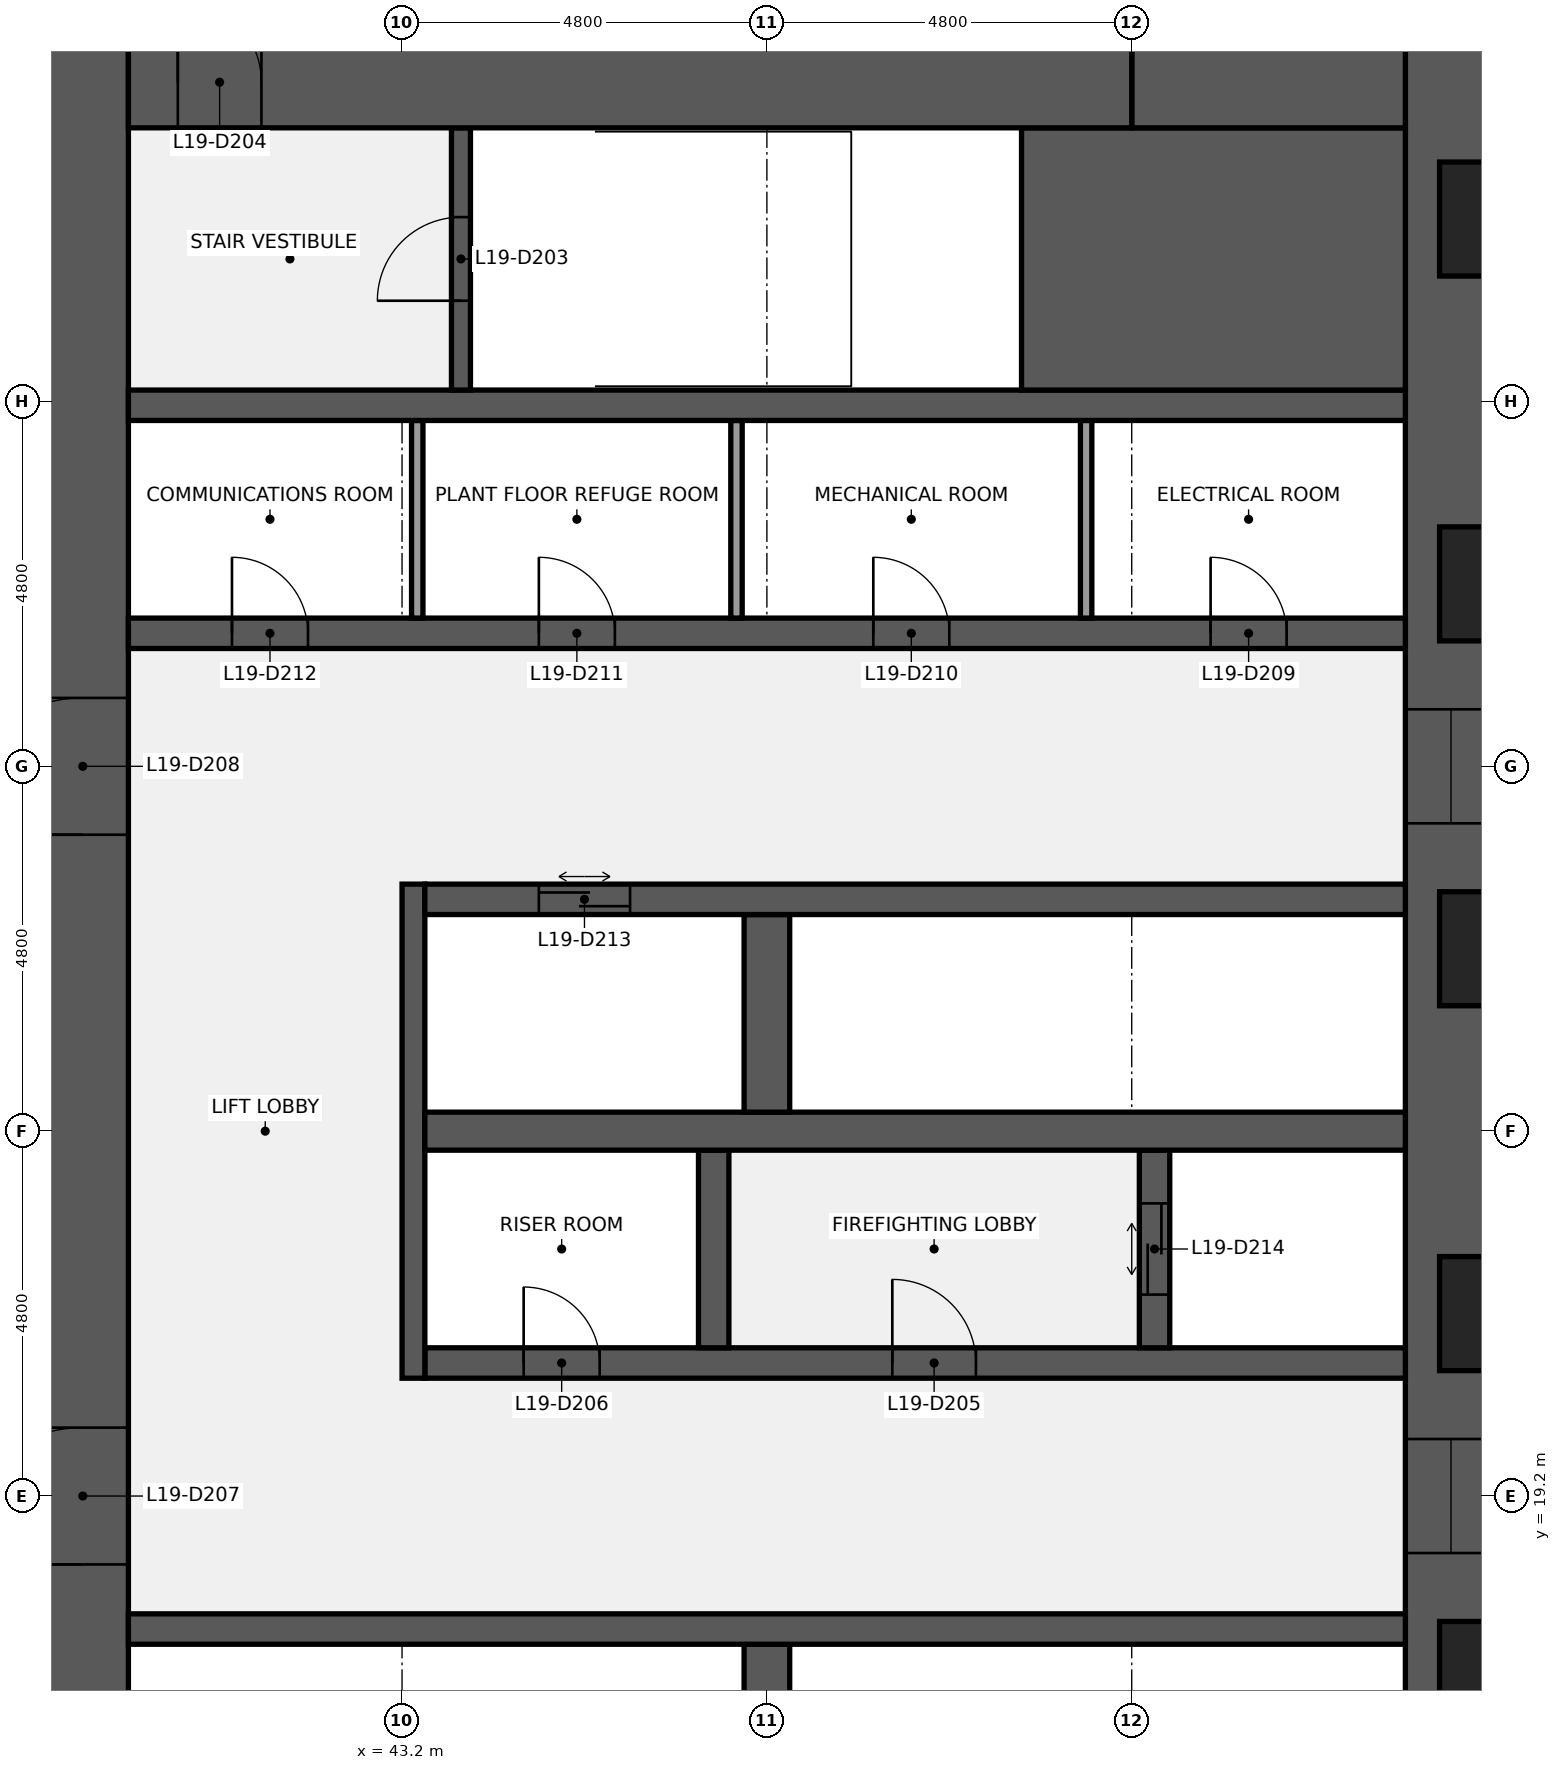
"""IFC4 building model, lengths in metres.
Left out: names, types, materials, properties, quantities, classifications, styles, units other than length and angle.
Written with IfcOpenShell. Run it as: python <this file> out.ifc"""

import sys

from ifc_helpers import new_model, si_unit, direction, frame, frame_2d, origin, place, context, subcontext, project, spatial, rectangle, extrude, element, fill, save


model = new_model("IFC4")
c1 = context("Model", 3, precision=1e-05, world=origin(), true_north=direction((0.0, 1.0)))
c2 = subcontext(c1, "Body", "Model", "MODEL_VIEW")
j1 = project(units=[si_unit("LENGTHUNIT", "METRE"), si_unit("PLANEANGLEUNIT", "RADIAN")], contexts=[c1])
p1 = place(None, origin())
s1 = spatial("IfcSite", under=j1, at=p1, CompositionType="ELEMENT")
p2 = place(p1, origin())
s2 = spatial("IfcBuilding", under=s1, at=p2, CompositionType="ELEMENT")
p3 = place(p2, frame((0.0, 0.0, 87.0)))
s3 = spatial("IfcBuildingStorey", under=s2, at=p3, CompositionType="ELEMENT", Elevation=87.0)
p4 = place(p3, frame((57.0, 38.4, 0.0), z_axis=(0.0, 0.0, 1.0), x_axis=(0.0, -1.0, 0.0)))
e1 = element("IfcWall", 1, at=p4, inside=s3, PredefinedType="SHEAR", context=c2, shape_type="SweptSolid", body=[
    extrude(rectangle(XDim=28.8, YDim=1.2, at=frame_2d((14.4, 0.0))), origin(), (0.0, 0.0, 1.0), 4.1),
])
p5 = place(p4, frame((18.45, 0.0, 0.9)))
e2 = element("IfcOpeningElement", 2, at=p5, cuts=e1, PredefinedType="OPENING", context=c2, shape_type="SweptSolid", body=[
    extrude(rectangle(XDim=1.5, YDim=1.5, at=frame_2d((0.75, 0.75))), frame((0.0, 0.61, 0.0), z_axis=(0.0, -1.0, 0.0), x_axis=(1.0, 0.0, 0.0)), (0.0, 0.0, 1.0), 1.22),
])
p6 = place(p4, frame((8.85, 0.0, 0.9)))
e3 = element("IfcOpeningElement", 3, at=p6, cuts=e1, PredefinedType="OPENING", context=c2, shape_type="SweptSolid", body=[
    extrude(rectangle(XDim=1.5, YDim=1.5, at=frame_2d((0.75, 0.75))), frame((0.0, 0.61, 0.0), z_axis=(0.0, -1.0, 0.0), x_axis=(1.0, 0.0, 0.0)), (0.0, 0.0, 1.0), 1.22),
])
p7 = place(p3, frame((39.0, 9.6, 0.0), z_axis=(0.0, 0.0, 1.0), x_axis=(0.0, 1.0, 0.0)))
e4 = element("IfcWall", 4, at=p7, inside=s3, PredefinedType="SHEAR", context=c2, shape_type="SweptSolid", body=[
    extrude(rectangle(XDim=28.8, YDim=1.2, at=frame_2d((14.4, 0.0))), origin(), (0.0, 0.0, 1.0), 4.1),
])
p8 = place(p7, frame((8.7, 0.0, 0.0)))
e5 = element("IfcOpeningElement", 5, at=p8, cuts=e4, PredefinedType="OPENING", context=c2, shape_type="SweptSolid", body=[
    extrude(rectangle(XDim=1.8, YDim=2.1, at=frame_2d((0.9, 1.05))), frame((0.0, 0.61, 0.0), z_axis=(0.0, -1.0, 0.0), x_axis=(1.0, 0.0, 0.0)), (0.0, 0.0, 1.0), 1.22),
])
p9 = place(p7, frame((18.3, 0.0, 0.0)))
e6 = element("IfcOpeningElement", 6, at=p9, cuts=e4, PredefinedType="OPENING", context=c2, shape_type="SweptSolid", body=[
    extrude(rectangle(XDim=1.8, YDim=2.1, at=frame_2d((0.9, 1.05))), frame((0.0, 0.61, 0.0), z_axis=(0.0, -1.0, 0.0), x_axis=(1.0, 0.0, 0.0)), (0.0, 0.0, 1.0), 1.22),
])
p10 = place(p3, frame((48.0, 14.65, 0.0), z_axis=(0.0, 0.0, 1.0), x_axis=(0.0, 1.0, 0.0)))
e7 = element("IfcWall", 7, at=p10, inside=s3, PredefinedType="SHEAR", context=c2, shape_type="SweptSolid", body=[
    extrude(rectangle(XDim=2.6, YDim=0.6, at=frame_2d((1.3, 0.0))), origin(), (0.0, 0.0, 1.0), 4.1),
])
p11 = place(p3, frame((39.6, 17.45, 0.0), z_axis=(0.0, 0.0, 1.0), x_axis=(1.0, 0.0, 0.0)))
e8 = element("IfcWall", 8, at=p11, inside=s3, PredefinedType="SHEAR", context=c2, shape_type="SweptSolid", body=[
    extrude(rectangle(XDim=16.8, YDim=0.4, at=frame_2d((8.4, 0.0))), origin(), (0.0, 0.0, 1.0), 4.1),
])
p12 = place(p3, frame((43.5, 20.95, 0.0), z_axis=(0.0, 0.0, 1.0), x_axis=(1.0, 0.0, 0.0)))
e9 = element("IfcWall", 9, at=p12, inside=s3, PredefinedType="SHEAR", context=c2, shape_type="SweptSolid", body=[
    extrude(rectangle(XDim=12.9, YDim=0.4, at=frame_2d((6.45, 0.0))), origin(), (0.0, 0.0, 1.0), 4.1),
])
p13 = place(p12, frame((6.15, 0.0, 0.0)))
e10 = element("IfcOpeningElement", 10, at=p13, cuts=e9, PredefinedType="OPENING", context=c2, shape_type="SweptSolid", body=[
    extrude(rectangle(XDim=1.1, YDim=2.1, at=frame_2d((0.55, 1.05))), frame((0.0, 0.21, 0.0), z_axis=(0.0, -1.0, 0.0), x_axis=(1.0, 0.0, 0.0)), (0.0, 0.0, 1.0), 0.42),
])
p14 = place(p12, frame((1.3, 0.0, 0.0)))
e11 = element("IfcOpeningElement", 11, at=p14, cuts=e9, PredefinedType="OPENING", context=c2, shape_type="SweptSolid", body=[
    extrude(rectangle(XDim=1.0, YDim=2.1, at=frame_2d((0.5, 1.05))), frame((0.0, 0.21, 0.0), z_axis=(0.0, -1.0, 0.0), x_axis=(1.0, 0.0, 0.0)), (0.0, 0.0, 1.0), 0.42),
])
p15 = place(p3, frame((43.35, 20.75, 0.0), z_axis=(0.0, 0.0, 1.0), x_axis=(0.0, 1.0, 0.0)))
e12 = element("IfcWall", 12, at=p15, inside=s3, PredefinedType="SHEAR", context=c2, shape_type="SweptSolid", body=[
    extrude(rectangle(XDim=6.5, YDim=0.3, at=frame_2d((3.25, 0.0))), origin(), (0.0, 0.0, 1.0), 4.1),
])
p16 = place(p3, frame((53.1, 21.15, 0.0), z_axis=(0.0, 0.0, 1.0), x_axis=(0.0, 1.0, 0.0)))
e13 = element("IfcWall", 13, at=p16, inside=s3, PredefinedType="SHEAR", context=c2, shape_type="SweptSolid", body=[
    extrude(rectangle(XDim=2.6, YDim=0.4, at=frame_2d((1.3, 0.0))), origin(), (0.0, 0.0, 1.0), 4.1),
])
p17 = place(p16, frame((0.7, 0.0, 0.0)))
e14 = element("IfcOpeningElement", 14, at=p17, cuts=e13, PredefinedType="OPENING", context=c2, shape_type="SweptSolid", body=[
    extrude(rectangle(XDim=1.2, YDim=2.1, at=frame_2d((0.6, 1.05))), frame((0.0, 0.21, 0.0), z_axis=(0.0, -1.0, 0.0), x_axis=(1.0, 0.0, 0.0)), (0.0, 0.0, 1.0), 0.42),
])
p18 = place(p3, frame((47.3, 21.15, 0.0), z_axis=(0.0, 0.0, 1.0), x_axis=(0.0, 1.0, 0.0)))
e15 = element("IfcWall", 15, at=p18, inside=s3, PredefinedType="SHEAR", context=c2, shape_type="SweptSolid", body=[
    extrude(rectangle(XDim=2.6, YDim=0.4, at=frame_2d((1.3, 0.0))), origin(), (0.0, 0.0, 1.0), 4.1),
])
p19 = place(p3, frame((43.5, 24.0, 0.0), z_axis=(0.0, 0.0, 1.0), x_axis=(1.0, 0.0, 0.0)))
e16 = element("IfcWall", 16, at=p19, inside=s3, PredefinedType="SHEAR", context=c2, shape_type="SweptSolid", body=[
    extrude(rectangle(XDim=12.9, YDim=0.5, at=frame_2d((6.45, 0.0))), origin(), (0.0, 0.0, 1.0), 4.1),
])
p20 = place(p3, frame((48.0, 24.25, 0.0), z_axis=(0.0, 0.0, 1.0), x_axis=(0.0, 1.0, 0.0)))
e17 = element("IfcWall", 17, at=p20, inside=s3, PredefinedType="SHEAR", context=c2, shape_type="SweptSolid", body=[
    extrude(rectangle(XDim=2.6, YDim=0.6, at=frame_2d((1.3, 0.0))), origin(), (0.0, 0.0, 1.0), 4.1),
])
p21 = place(p3, frame((43.5, 27.05, 0.0), z_axis=(0.0, 0.0, 1.0), x_axis=(1.0, 0.0, 0.0)))
e18 = element("IfcWall", 18, at=p21, inside=s3, PredefinedType="SHEAR", context=c2, shape_type="SweptSolid", body=[
    extrude(rectangle(XDim=12.9, YDim=0.4, at=frame_2d((6.45, 0.0))), origin(), (0.0, 0.0, 1.0), 4.1),
])
p22 = place(p21, frame((1.5, 0.0, 0.0)))
e19 = element("IfcOpeningElement", 19, at=p22, cuts=e18, PredefinedType="OPENING", context=c2, shape_type="SweptSolid", body=[
    extrude(rectangle(XDim=1.2, YDim=2.1, at=frame_2d((0.6, 1.05))), frame((0.0, 0.21, 0.0), z_axis=(0.0, -1.0, 0.0), x_axis=(1.0, 0.0, 0.0)), (0.0, 0.0, 1.0), 0.42),
])
p23 = place(p3, frame((39.6, 30.55, 0.0), z_axis=(0.0, 0.0, 1.0), x_axis=(1.0, 0.0, 0.0)))
e20 = element("IfcWall", 20, at=p23, inside=s3, PredefinedType="SHEAR", context=c2, shape_type="SweptSolid", body=[
    extrude(rectangle(XDim=16.8, YDim=0.4, at=frame_2d((8.4, 0.0))), origin(), (0.0, 0.0, 1.0), 4.1),
])
p24 = place(p23, frame((14.238, 0.0, 0.0)))
e21 = element("IfcOpeningElement", 21, at=p24, cuts=e20, PredefinedType="OPENING", context=c2, shape_type="SweptSolid", body=[
    extrude(rectangle(XDim=1.0, YDim=2.1, at=frame_2d((0.5, 1.05))), frame((0.0, 0.21, 0.0), z_axis=(0.0, -1.0, 0.0), x_axis=(1.0, 0.0, 0.0)), (0.0, 0.0, 1.0), 0.42),
])
p25 = place(p23, frame((9.8, 0.0, 0.0)))
e22 = element("IfcOpeningElement", 22, at=p25, cuts=e20, PredefinedType="OPENING", context=c2, shape_type="SweptSolid", body=[
    extrude(rectangle(XDim=1.0, YDim=2.1, at=frame_2d((0.5, 1.05))), frame((0.0, 0.21, 0.0), z_axis=(0.0, -1.0, 0.0), x_axis=(1.0, 0.0, 0.0)), (0.0, 0.0, 1.0), 0.42),
])
p26 = place(p23, frame((5.4, 0.0, 0.0)))
e23 = element("IfcOpeningElement", 23, at=p26, cuts=e20, PredefinedType="OPENING", context=c2, shape_type="SweptSolid", body=[
    extrude(rectangle(XDim=1.0, YDim=2.1, at=frame_2d((0.5, 1.05))), frame((0.0, 0.21, 0.0), z_axis=(0.0, -1.0, 0.0), x_axis=(1.0, 0.0, 0.0)), (0.0, 0.0, 1.0), 0.42),
])
p27 = place(p23, frame((1.363, 0.0, 0.0)))
e24 = element("IfcOpeningElement", 24, at=p27, cuts=e20, PredefinedType="OPENING", context=c2, shape_type="SweptSolid", body=[
    extrude(rectangle(XDim=1.0, YDim=2.1, at=frame_2d((0.5, 1.05))), frame((0.0, 0.21, 0.0), z_axis=(0.0, -1.0, 0.0), x_axis=(1.0, 0.0, 0.0)), (0.0, 0.0, 1.0), 0.42),
])
for number, where, z_axis, x_axis in (
    (25, (52.2, 30.75, 0.0), (0.0, 0.0, 1.0), (0.0, 1.0, 0.0)),
    (26, (47.6, 30.75, 0.0), (0.0, 0.0, 1.0), (0.0, 1.0, 0.0)),
    (27, (43.4, 30.75, 0.0), (0.0, 0.0, 1.0), (0.0, 1.0, 0.0)),
):
    element("IfcWall", number, at=place(p3, frame(where, z_axis=z_axis, x_axis=x_axis)), inside=s3, PredefinedType="PARTITIONING", context=c2, shape_type="SweptSolid", body=[
        extrude(rectangle(XDim=2.6, YDim=0.15, at=frame_2d((1.3, 0.0))), origin(), (0.0, 0.0, 1.0), 4.1),
    ])
p28 = place(p3, frame((39.6, 33.55, 0.0), z_axis=(0.0, 0.0, 1.0), x_axis=(1.0, 0.0, 0.0)))
e28 = element("IfcWall", 28, at=p28, inside=s3, PredefinedType="SHEAR", context=c2, shape_type="SweptSolid", body=[
    extrude(rectangle(XDim=16.8, YDim=0.4, at=frame_2d((8.4, 0.0))), origin(), (0.0, 0.0, 1.0), 4.1),
])
p29 = place(p3, frame((51.35, 35.475, 0.0), z_axis=(0.0, 0.0, 1.0), x_axis=(1.0, 0.0, 0.0)))
e29 = element("IfcWall", 29, at=p29, inside=s3, PredefinedType="SHEAR", context=c2, shape_type="SweptSolid", body=[
    extrude(rectangle(XDim=5.05, YDim=3.45, at=frame_2d((2.525, 0.0))), origin(), (0.0, 0.0, 1.0), 4.1),
])
p30 = place(p3, frame((43.975, 33.75, 0.0), z_axis=(0.0, 0.0, 1.0), x_axis=(0.0, 1.0, 0.0)))
e30 = element("IfcWall", 30, at=p30, inside=s3, PredefinedType="SHEAR", context=c2, shape_type="SweptSolid", body=[
    extrude(rectangle(XDim=3.45, YDim=0.25, at=frame_2d((1.725, 0.0))), origin(), (0.0, 0.0, 1.0), 4.1),
])
p31 = place(p30, frame((1.175, 0.0, 0.0)))
e31 = element("IfcOpeningElement", 31, at=p31, cuts=e30, PredefinedType="OPENING", context=c2, shape_type="SweptSolid", body=[
    extrude(rectangle(XDim=1.1, YDim=2.1, at=frame_2d((0.55, 1.05))), frame((0.0, 0.135, 0.0), z_axis=(0.0, -1.0, 0.0), x_axis=(1.0, 0.0, 0.0)), (0.0, 0.0, 1.0), 0.27),
])
p32 = place(p3, frame((52.8, 37.8, 0.0), z_axis=(0.0, 0.0, 1.0), x_axis=(1.0, 0.0, 0.0)))
e32 = element("IfcWall", 32, at=p32, inside=s3, PredefinedType="SHEAR", context=c2, shape_type="SweptSolid", body=[
    extrude(rectangle(XDim=3.6, YDim=1.2, at=frame_2d((1.8, 0.0))), origin(), (0.0, 0.0, 1.0), 4.1),
])
p33 = place(p3, frame((39.6, 37.8, 0.0), z_axis=(0.0, 0.0, 1.0), x_axis=(1.0, 0.0, 0.0)))
e33 = element("IfcWall", 33, at=p33, inside=s3, PredefinedType="SHEAR", context=c2, shape_type="SweptSolid", body=[
    extrude(rectangle(XDim=13.2, YDim=1.2, at=frame_2d((6.6, 0.0))), origin(), (0.0, 0.0, 1.0), 4.1),
])
p34 = place(p33, frame((0.65, 0.0, 0.0)))
e34 = element("IfcOpeningElement", 34, at=p34, cuts=e33, PredefinedType="OPENING", context=c2, shape_type="SweptSolid", body=[
    extrude(rectangle(XDim=1.1, YDim=2.1, at=frame_2d((0.55, 1.05))), frame((0.0, 0.61, 0.0), z_axis=(0.0, -1.0, 0.0), x_axis=(1.0, 0.0, 0.0)), (0.0, 0.0, 1.0), 1.22),
])
p35 = place(p31, origin())
e35 = element("IfcDoor", 35, at=p35, inside=s3, OperationType="SINGLE_SWING_LEFT", PredefinedType="DOOR", context=c2, shape_type="SweptSolid", body=[
    extrude(rectangle(XDim=1.1, YDim=2.1, at=frame_2d((0.55, 1.05))), frame((0.0, 0.025, 0.0), z_axis=(0.0, -1.0, 0.0), x_axis=(1.0, 0.0, 0.0)), (0.0, 0.0, 1.0), 0.05),
])
fill(e31, e35)
p36 = place(p34, origin())
e36 = element("IfcDoor", 36, at=p36, inside=s3, OperationType="SINGLE_SWING_LEFT", PredefinedType="DOOR", context=c2, shape_type="SweptSolid", body=[
    extrude(rectangle(XDim=1.1, YDim=2.1, at=frame_2d((0.55, 1.05))), frame((0.0, 0.025, 0.0), z_axis=(0.0, -1.0, 0.0), x_axis=(1.0, 0.0, 0.0)), (0.0, 0.0, 1.0), 0.05),
])
fill(e34, e36)
p37 = place(p13, origin())
e37 = element("IfcDoor", 37, at=p37, inside=s3, OperationType="SINGLE_SWING_LEFT", PredefinedType="DOOR", context=c2, shape_type="SweptSolid", body=[
    extrude(rectangle(XDim=1.1, YDim=2.1, at=frame_2d((0.55, 1.05))), frame((0.0, 0.025, 0.0), z_axis=(0.0, -1.0, 0.0), x_axis=(1.0, 0.0, 0.0)), (0.0, 0.0, 1.0), 0.05),
])
fill(e10, e37)
p38 = place(p14, origin())
e38 = element("IfcDoor", 38, at=p38, inside=s3, OperationType="SINGLE_SWING_LEFT", PredefinedType="DOOR", context=c2, shape_type="SweptSolid", body=[
    extrude(rectangle(XDim=1.0, YDim=2.1, at=frame_2d((0.5, 1.05))), frame((0.0, 0.025, 0.0), z_axis=(0.0, -1.0, 0.0), x_axis=(1.0, 0.0, 0.0)), (0.0, 0.0, 1.0), 0.05),
])
fill(e11, e38)
p39 = place(p8, origin())
e39 = element("IfcDoor", 39, at=p39, inside=s3, OperationType="DOUBLE_DOOR_SINGLE_SWING", PredefinedType="DOOR", context=c2, shape_type="SweptSolid", body=[
    extrude(rectangle(XDim=1.8, YDim=2.1, at=frame_2d((0.9, 1.05))), frame((0.0, 0.025, 0.0), z_axis=(0.0, -1.0, 0.0), x_axis=(1.0, 0.0, 0.0)), (0.0, 0.0, 1.0), 0.05),
])
fill(e5, e39)
p40 = place(p9, origin())
e40 = element("IfcDoor", 40, at=p40, inside=s3, OperationType="DOUBLE_DOOR_SINGLE_SWING", PredefinedType="DOOR", context=c2, shape_type="SweptSolid", body=[
    extrude(rectangle(XDim=1.8, YDim=2.1, at=frame_2d((0.9, 1.05))), frame((0.0, 0.025, 0.0), z_axis=(0.0, -1.0, 0.0), x_axis=(1.0, 0.0, 0.0)), (0.0, 0.0, 1.0), 0.05),
])
fill(e6, e40)
p41 = place(p24, origin())
e41 = element("IfcDoor", 41, at=p41, inside=s3, OperationType="SINGLE_SWING_LEFT", PredefinedType="DOOR", context=c2, shape_type="SweptSolid", body=[
    extrude(rectangle(XDim=1.0, YDim=2.1, at=frame_2d((0.5, 1.05))), frame((0.0, 0.025, 0.0), z_axis=(0.0, -1.0, 0.0), x_axis=(1.0, 0.0, 0.0)), (0.0, 0.0, 1.0), 0.05),
])
fill(e21, e41)
p42 = place(p25, origin())
e42 = element("IfcDoor", 42, at=p42, inside=s3, OperationType="SINGLE_SWING_LEFT", PredefinedType="DOOR", context=c2, shape_type="SweptSolid", body=[
    extrude(rectangle(XDim=1.0, YDim=2.1, at=frame_2d((0.5, 1.05))), frame((0.0, 0.025, 0.0), z_axis=(0.0, -1.0, 0.0), x_axis=(1.0, 0.0, 0.0)), (0.0, 0.0, 1.0), 0.05),
])
fill(e22, e42)
p43 = place(p26, origin())
e43 = element("IfcDoor", 43, at=p43, inside=s3, OperationType="SINGLE_SWING_LEFT", PredefinedType="DOOR", context=c2, shape_type="SweptSolid", body=[
    extrude(rectangle(XDim=1.0, YDim=2.1, at=frame_2d((0.5, 1.05))), frame((0.0, 0.025, 0.0), z_axis=(0.0, -1.0, 0.0), x_axis=(1.0, 0.0, 0.0)), (0.0, 0.0, 1.0), 0.05),
])
fill(e23, e43)
p44 = place(p27, origin())
e44 = element("IfcDoor", 44, at=p44, inside=s3, OperationType="SINGLE_SWING_LEFT", PredefinedType="DOOR", context=c2, shape_type="SweptSolid", body=[
    extrude(rectangle(XDim=1.0, YDim=2.1, at=frame_2d((0.5, 1.05))), frame((0.0, 0.025, 0.0), z_axis=(0.0, -1.0, 0.0), x_axis=(1.0, 0.0, 0.0)), (0.0, 0.0, 1.0), 0.05),
])
fill(e24, e44)
p45 = place(p22, origin())
e45 = element("IfcDoor", 45, at=p45, inside=s3, OperationType="DOUBLE_DOOR_SLIDING", PredefinedType="DOOR", context=c2, shape_type="SweptSolid", body=[
    extrude(rectangle(XDim=1.2, YDim=2.1, at=frame_2d((0.6, 1.05))), frame((0.0, 0.025, 0.0), z_axis=(0.0, -1.0, 0.0), x_axis=(1.0, 0.0, 0.0)), (0.0, 0.0, 1.0), 0.05),
])
fill(e19, e45)
p46 = place(p17, origin())
e46 = element("IfcDoor", 46, at=p46, inside=s3, OperationType="DOUBLE_DOOR_SLIDING", PredefinedType="DOOR", context=c2, shape_type="SweptSolid", body=[
    extrude(rectangle(XDim=1.2, YDim=2.1, at=frame_2d((0.6, 1.05))), frame((0.0, 0.025, 0.0), z_axis=(0.0, -1.0, 0.0), x_axis=(1.0, 0.0, 0.0)), (0.0, 0.0, 1.0), 0.05),
])
fill(e14, e46)
p47 = place(p5, origin())
e47 = element("IfcWindow", 47, at=p47, inside=s3, PartitioningType="SINGLE_PANEL", PredefinedType="WINDOW", context=c2, shape_type="SweptSolid", body=[
    extrude(rectangle(XDim=1.5, YDim=1.5, at=frame_2d((0.75, 0.75))), frame((0.0, 0.03, 0.0), z_axis=(0.0, -1.0, 0.0), x_axis=(1.0, 0.0, 0.0)), (0.0, 0.0, 1.0), 0.06),
])
fill(e2, e47)
p48 = place(p6, origin())
e48 = element("IfcWindow", 48, at=p48, inside=s3, PartitioningType="SINGLE_PANEL", PredefinedType="WINDOW", context=c2, shape_type="SweptSolid", body=[
    extrude(rectangle(XDim=1.5, YDim=1.5, at=frame_2d((0.75, 0.75))), frame((0.0, 0.03, 0.0), z_axis=(0.0, -1.0, 0.0), x_axis=(1.0, 0.0, 0.0)), (0.0, 0.0, 1.0), 0.06),
])
fill(e3, e48)
save(model, sys.argv[1])
